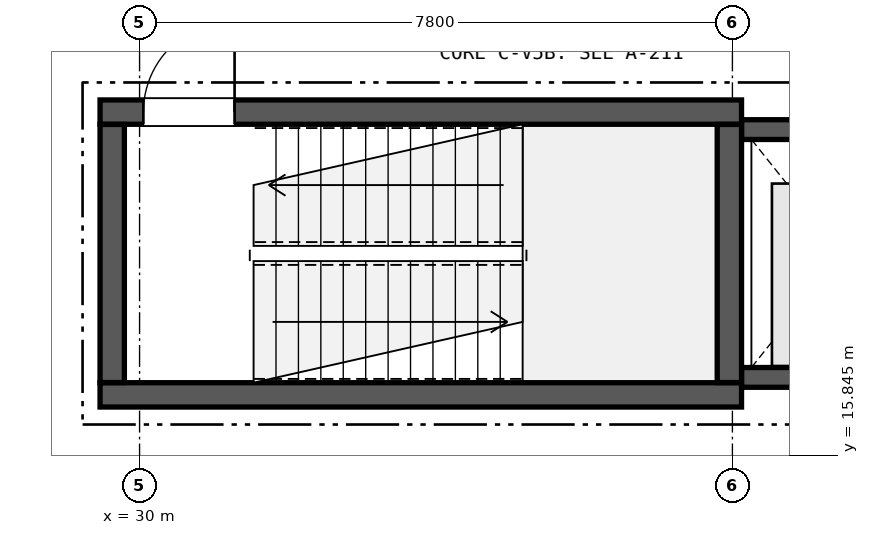
"""IFC4 building model, lengths in metres.
Left out: names, types, materials, properties, quantities, classifications, styles, units other than length and angle.
Written with IfcOpenShell. Run it as: python <this file> out.ifc"""

import sys

from ifc_helpers import new_model, si_unit, direction, frame, frame_2d, origin, place, context, subcontext, project, spatial, rectangle, extrude, element, fill, save


model = new_model("IFC4")
c1 = context("Model", 3, precision=1e-05, world=origin(), true_north=direction((0.0, 1.0)))
c2 = subcontext(c1, "Body", "Model", "MODEL_VIEW")
j1 = project(units=[si_unit("LENGTHUNIT", "METRE"), si_unit("PLANEANGLEUNIT", "RADIAN")], contexts=[c1])
p1 = place(None, origin())
s1 = spatial("IfcSite", under=j1, at=p1, CompositionType="ELEMENT")
p2 = place(p1, origin())
s2 = spatial("IfcBuilding", under=s1, at=p2, CompositionType="ELEMENT")
p3 = place(p2, frame((0.0, 0.0, -4.42)))
s3 = spatial("IfcBuildingStorey", under=s2, at=p3, CompositionType="ELEMENT", Elevation=-4.42)
p4 = place(p3, frame((29.48, 16.64, 0.0), z_axis=(0.0, 0.0, 1.0), x_axis=(1.0, 0.0, 0.0)))
e1 = element("IfcWall", 1, at=p4, inside=s3, PredefinedType="SHEAR", context=c2, shape_type="SweptSolid", body=[
    extrude(rectangle(XDim=8.44, YDim=0.32, at=frame_2d((4.22, 0.0))), origin(), (0.0, 0.0, 1.0), 4.105),
])
p5 = place(p3, frame((29.48, 20.36, 0.0), z_axis=(0.0, 0.0, 1.0), x_axis=(1.0, 0.0, 0.0)))
e2 = element("IfcWall", 2, at=p5, inside=s3, PredefinedType="SHEAR", context=c2, shape_type="SweptSolid", body=[
    extrude(rectangle(XDim=8.44, YDim=0.32, at=frame_2d((4.22, 0.0))), origin(), (0.0, 0.0, 1.0), 4.105),
])
p6 = place(p5, frame((0.57, 0.0, 0.0)))
e3 = element("IfcOpeningElement", 3, at=p6, cuts=e2, PredefinedType="OPENING", context=c2, shape_type="SweptSolid", body=[
    extrude(rectangle(XDim=1.2, YDim=2.2, at=frame_2d((0.6, 1.1))), frame((0.0, 0.17, 0.0), z_axis=(0.0, -1.0, 0.0), x_axis=(1.0, 0.0, 0.0)), (0.0, 0.0, 1.0), 0.34),
])
for number, where, z_axis, x_axis in (
    (4, (29.64, 16.802, 0.0), (0.0, 0.0, 1.0), (0.0, 1.0, 0.0)),
    (5, (37.76, 16.802, 0.0), (0.0, 0.0, 1.0), (0.0, 1.0, 0.0)),
):
    element("IfcWall", number, at=place(p3, frame(where, z_axis=z_axis, x_axis=x_axis)), inside=s3, PredefinedType="SHEAR", context=c2, shape_type="SweptSolid", body=[
        extrude(rectangle(XDim=3.396, YDim=0.32, at=frame_2d((1.698, 0.0))), origin(), (0.0, 0.0, 1.0), 4.105),
    ])
p7 = place(p3, frame((37.922, 16.87, 0.0), z_axis=(0.0, 0.0, 1.0), x_axis=(1.0, 0.0, 0.0)))
e6 = element("IfcWall", 6, at=p7, inside=s3, PredefinedType="SHEAR", context=c2, shape_type="SweptSolid", body=[
    extrude(rectangle(XDim=2.658, YDim=0.26, at=frame_2d((1.329, 0.0))), origin(), (0.0, 0.0, 1.0), 4.105),
])
p8 = place(p3, frame((37.922, 20.13, 0.0), z_axis=(0.0, 0.0, 1.0), x_axis=(1.0, 0.0, 0.0)))
e7 = element("IfcWall", 7, at=p8, inside=s3, PredefinedType="SHEAR", context=c2, shape_type="SweptSolid", body=[
    extrude(rectangle(XDim=2.658, YDim=0.26, at=frame_2d((1.329, 0.0))), origin(), (0.0, 0.0, 1.0), 4.105),
])
p9 = place(p8, frame((0.679, 0.0, 0.0)))
e8 = element("IfcOpeningElement", 8, at=p9, cuts=e7, PredefinedType="OPENING", context=c2, shape_type="SweptSolid", body=[
    extrude(rectangle(XDim=1.3, YDim=2.2, at=frame_2d((0.65, 1.1))), frame((0.0, 0.14, 0.0), z_axis=(0.0, -1.0, 0.0), x_axis=(1.0, 0.0, 0.0)), (0.0, 0.0, 1.0), 0.28),
])
p10 = place(p6, origin())
e9 = element("IfcDoor", 9, at=p10, inside=s3, OperationType="SINGLE_SWING_RIGHT", PredefinedType="DOOR", context=c2, shape_type="SweptSolid", body=[
    extrude(rectangle(XDim=1.2, YDim=2.2, at=frame_2d((0.6, 1.1))), frame((0.0, 0.025, 0.0), z_axis=(0.0, -1.0, 0.0), x_axis=(1.0, 0.0, 0.0)), (0.0, 0.0, 1.0), 0.05),
])
fill(e3, e9)
save(model, sys.argv[1])
